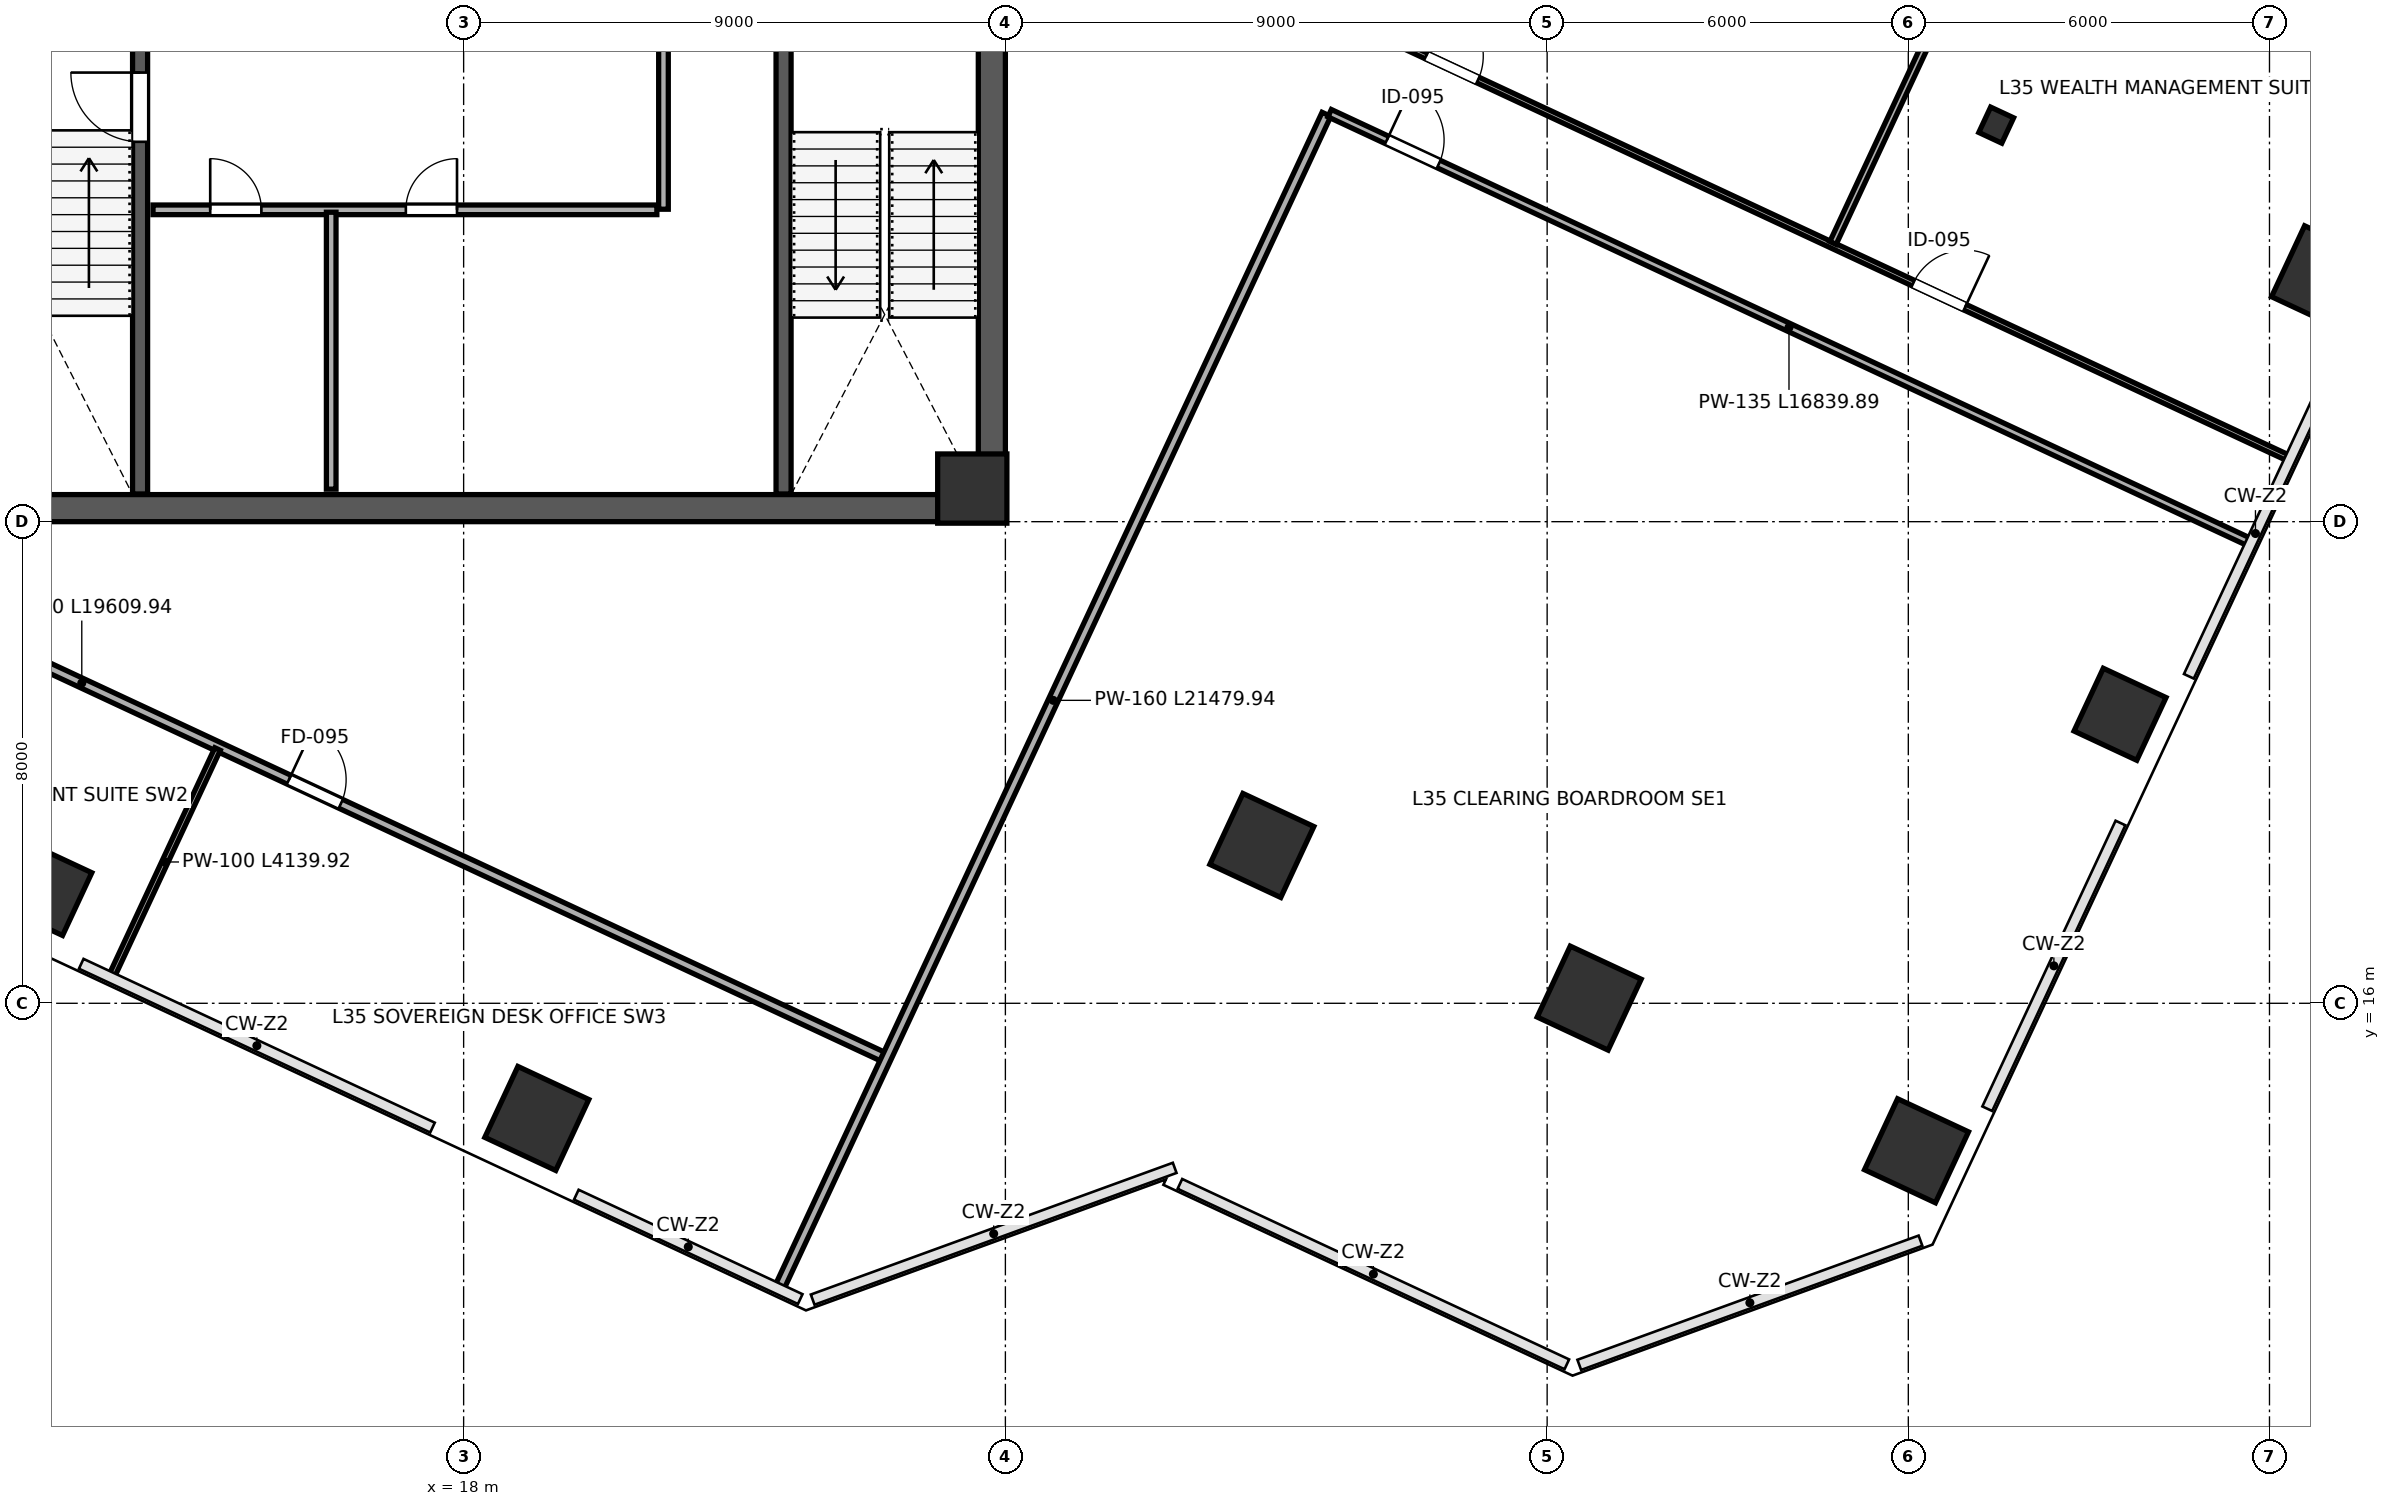
"""IFC4 building model, lengths in metres.
Left out: names, types, materials, properties, quantities, classifications, styles, units other than length and angle.
Written with IfcOpenShell. Run it as: python <this file> out.ifc"""

import sys

from ifc_helpers import new_model, si_unit, direction, frame, frame_2d, origin, origin_2d, place, context, subcontext, project, spatial, rectangle, i_section, extrude, clip, halfspace, source, transform, mapped, element, fill, save


model = new_model("IFC4")
c1 = context("Model", 3, precision=1e-05, world=origin(), true_north=direction((0.0, 1.0)))
c2 = subcontext(c1, "Body", "Model", "MODEL_VIEW")
j1 = project(units=[si_unit("LENGTHUNIT", "METRE"), si_unit("PLANEANGLEUNIT", "RADIAN")], contexts=[c1])
p1 = place(None, origin())
s1 = spatial("IfcSite", under=j1, at=p1, CompositionType="ELEMENT")
p2 = place(p1, origin())
s2 = spatial("IfcBuilding", under=s1, at=p2, CompositionType="ELEMENT")
p3 = place(p2, frame((0.0, 0.0, 158.2)))
s3 = spatial("IfcBuildingStorey", under=s2, at=p3, CompositionType="ELEMENT", Elevation=158.2)
m1 = source(origin(), c2, "Body", "SweptSolid", [
    extrude(rectangle(XDim=1.15, YDim=1.15, at=origin_2d()), origin(), (0.0, 0.0, 1.0), 4.198),
])
p4 = place(p3, frame((26.45, 24.55, 0.001), z_axis=(0.0, 0.0, 1.0), x_axis=(1.0, 0.0, 0.0)))
e1 = element("IfcColumn", 1, at=p4, inside=s3, PredefinedType="COLUMN", context=c2, shape_type="MappedRepresentation", body=[
    mapped(m1, transform((0.0, 0.0, 0.0), scale=1.0)),
])
p5 = place(p3, frame((11.059, 17.891, 0.0), z_axis=(-0.072361701671, 0.054821225186, 0.995870683071), x_axis=(0.882762810031, 0.468249744812, 0.038366622345)))
e2 = element("IfcColumn", 2, at=p5, inside=s3, PredefinedType="COLUMN", context=c2, shape_type="Clipping", body=[
    clip(clip(extrude(rectangle(XDim=1.15, YDim=1.15, at=origin_2d()), origin(), (0.0, 0.0, 1.0), 4.217), halfspace(frame((0.0, 0.0, 0.07), z_axis=(0.0, 0.0, -1.0), x_axis=(1.0, 0.0, 0.0)), False)), halfspace(frame((0.0, 0.0, 4.147), z_axis=(0.0, 0.0, 1.0), x_axis=(1.0, 0.0, 0.0)), False)),
])
p6 = place(p3, frame((19.216, 14.087, 0.0), z_axis=(-0.092542400719, 0.012790413107, 0.995626591349), x_axis=(0.540890321922, 0.84016595982, 0.039481889649)))
e3 = element("IfcColumn", 3, at=p6, inside=s3, PredefinedType="COLUMN", context=c2, shape_type="Clipping", body=[
    clip(clip(extrude(rectangle(XDim=1.3, YDim=1.3, at=origin_2d()), origin(), (0.0, 0.0, 1.0), 4.219), halfspace(frame((0.0, 0.0, 0.082), z_axis=(0.0, 0.0, -1.0), x_axis=(1.0, 0.0, 0.0)), False)), halfspace(frame((0.0, 0.0, 4.137), z_axis=(0.0, 0.0, 1.0), x_axis=(1.0, 0.0, 0.0)), False)),
])
p7 = place(p3, frame((31.26, 18.622, 0.0), z_axis=(-0.069788190522, -0.049749423783, 0.996320532408), x_axis=(-0.18322145328, 0.982404176345, 0.036220620606)))
e4 = element("IfcColumn", 4, at=p7, inside=s3, PredefinedType="COLUMN", context=c2, shape_type="Clipping", body=[
    clip(clip(extrude(rectangle(XDim=1.3, YDim=1.3, at=origin_2d()), origin(), (0.0, 0.0, 1.0), 4.216), halfspace(frame((0.0, 0.0, 0.075), z_axis=(0.0, 0.0, -1.0), x_axis=(1.0, 0.0, 0.0)), False)), halfspace(frame((0.0, 0.0, 4.141), z_axis=(0.0, 0.0, 1.0), x_axis=(1.0, 0.0, 0.0)), False)),
])
p8 = place(p3, frame((36.698, 16.086, 0.0), z_axis=(-0.082991265624, -0.077562470239, 0.993527308654), x_axis=(-0.312067697366, 0.948846199102, 0.04800669443)))
e5 = element("IfcColumn", 5, at=p8, inside=s3, PredefinedType="COLUMN", context=c2, shape_type="Clipping", body=[
    clip(clip(extrude(rectangle(XDim=1.3, YDim=1.3, at=origin_2d()), origin(), (0.0, 0.0, 1.0), 4.227), halfspace(frame((0.0, 0.0, 0.099), z_axis=(0.0, 0.0, -1.0), x_axis=(1.0, 0.0, 0.0)), False)), halfspace(frame((0.0, 0.0, 4.128), z_axis=(0.0, 0.0, 1.0), x_axis=(1.0, 0.0, 0.0)), False)),
])
p9 = place(p3, frame((43.46, 30.587, 0.0), z_axis=(-0.008489733, -0.113254193287, 0.993529774157), x_axis=(-0.87238491172, 0.486457395979, 0.04799758016)))
e6 = element("IfcColumn", 6, at=p9, inside=s3, PredefinedType="COLUMN", context=c2, shape_type="Clipping", body=[
    clip(clip(extrude(i_section(OverallWidth=0.421, OverallDepth=0.465, WebThickness=0.045, FlangeThickness=0.072, FilletRadius=0.015, at=origin_2d()), origin(), (0.0, 0.0, 1.0), 4.227), halfspace(frame((0.0, 0.0, 0.035), z_axis=(0.0, 0.0, -1.0), x_axis=(1.0, 0.0, 0.0)), False)), halfspace(frame((0.0, 0.0, 4.192), z_axis=(0.0, 0.0, 1.0), x_axis=(1.0, 0.0, 0.0)), False)),
])
p10 = place(p3, frame((42.136, 13.55, 0.0), z_axis=(-0.096030134675, -0.105063526612, 0.989818098748), x_axis=(-0.386748392781, 0.920221221066, 0.06015467547)))
e7 = element("IfcColumn", 7, at=p10, inside=s3, PredefinedType="COLUMN", context=c2, shape_type="Clipping", body=[
    clip(clip(extrude(rectangle(XDim=1.3, YDim=1.3, at=origin_2d()), origin(), (0.0, 0.0, 1.0), 4.243), halfspace(frame((0.0, 0.0, 0.125), z_axis=(0.0, 0.0, -1.0), x_axis=(1.0, 0.0, 0.0)), False)), halfspace(frame((0.0, 0.0, 4.118), z_axis=(0.0, 0.0, 1.0), x_axis=(1.0, 0.0, 0.0)), False)),
])
p11 = place(p3, frame((45.517, 20.801, 0.0), z_axis=(-0.058968527482, -0.122947076342, 0.990659744406), x_axis=(-0.636119850373, 0.769435288121, 0.05762701932)))
e8 = element("IfcColumn", 8, at=p11, inside=s3, PredefinedType="COLUMN", context=c2, shape_type="Clipping", body=[
    clip(clip(extrude(rectangle(XDim=1.15, YDim=1.15, at=origin_2d()), origin(), (0.0, 0.0, 1.0), 4.24), halfspace(frame((0.0, 0.0, 0.106), z_axis=(0.0, 0.0, -1.0), x_axis=(1.0, 0.0, 0.0)), False)), halfspace(frame((0.0, 0.0, 4.134), z_axis=(0.0, 0.0, 1.0), x_axis=(1.0, 0.0, 0.0)), False)),
])
p12 = place(p3, frame((48.898, 28.051, 0.0), z_axis=(-0.021864344018, -0.140622254685, 0.989821868797), x_axis=(-0.831278676398, 0.552592535403, 0.060143594692)))
e9 = element("IfcColumn", 9, at=p12, inside=s3, PredefinedType="COLUMN", context=c2, shape_type="Clipping", body=[
    clip(clip(extrude(rectangle(XDim=1.3, YDim=1.3, at=origin_2d()), origin(), (0.0, 0.0, 1.0), 4.243), halfspace(frame((0.0, 0.0, 0.125), z_axis=(0.0, 0.0, -1.0), x_axis=(1.0, 0.0, 0.0)), False)), halfspace(frame((0.0, 0.0, 4.118), z_axis=(0.0, 0.0, 1.0), x_axis=(1.0, 0.0, 0.0)), False)),
])
p13 = place(p3, frame((26.775, 24.45, 0.0), z_axis=(0.0, 0.0, 1.0), x_axis=(0.0, 1.0, 0.0)))
e10 = element("IfcWall", 10, at=p13, inside=s3, PredefinedType="SHEAR", context=c2, shape_type="SweptSolid", body=[
    extrude(rectangle(XDim=15.1, YDim=0.45, at=frame_2d((7.55, 0.0))), origin(), (0.0, 0.0, 1.0), 3.96),
])
p14 = place(p13, frame((8.6, 0.0, 0.0)))
e11 = element("IfcOpeningElement", 11, at=p14, cuts=e10, PredefinedType="OPENING", context=c2, shape_type="SweptSolid", body=[
    extrude(rectangle(XDim=1.15, YDim=2.2, at=frame_2d((0.575, 1.1))), frame((0.0, 0.235, 0.0), z_axis=(0.0, -1.0, 0.0), x_axis=(1.0, 0.0, 0.0)), (0.0, 0.0, 1.0), 0.47),
])
p15 = place(p3, frame((9.0, 24.225, 0.0), z_axis=(0.0, 0.0, 1.0), x_axis=(1.0, 0.0, 0.0)))
e12 = element("IfcWall", 12, at=p15, inside=s3, PredefinedType="SHEAR", context=c2, shape_type="SweptSolid", body=[
    extrude(rectangle(XDim=18.0, YDim=0.45, at=frame_2d((9.0, 0.0))), origin(), (0.0, 0.0, 1.0), 3.96),
])
p16 = place(p3, frame((12.625, 24.46, 0.0), z_axis=(0.0, 0.0, 1.0), x_axis=(0.0, 1.0, 0.0)))
e13 = element("IfcWall", 13, at=p16, inside=s3, PredefinedType="SHEAR", context=c2, shape_type="SweptSolid", body=[
    extrude(rectangle(XDim=7.49, YDim=0.25, at=frame_2d((3.745, 0.0))), origin(), (0.0, 0.0, 1.0), 3.96),
])
p17 = place(p16, frame((5.85, 0.0, 0.0)))
e14 = element("IfcOpeningElement", 14, at=p17, cuts=e13, PredefinedType="OPENING", context=c2, shape_type="SweptSolid", body=[
    extrude(rectangle(XDim=1.15, YDim=2.2, at=frame_2d((0.575, 1.1))), frame((0.0, 0.135, 0.0), z_axis=(0.0, -1.0, 0.0), x_axis=(1.0, 0.0, 0.0)), (0.0, 0.0, 1.0), 0.27),
])
p18 = place(p3, frame((23.315, 24.46, 0.0), z_axis=(0.0, 0.0, 1.0), x_axis=(0.0, 1.0, 0.0)))
e15 = element("IfcWall", 15, at=p18, inside=s3, PredefinedType="SHEAR", context=c2, shape_type="SweptSolid", body=[
    extrude(rectangle(XDim=7.49, YDim=0.25, at=frame_2d((3.745, 0.0))), origin(), (0.0, 0.0, 1.0), 3.96),
])
p19 = place(p3, frame((12.84, 29.18, 0.0), z_axis=(0.0, 0.0, 1.0), x_axis=(1.0, 0.0, 0.0)))
e16 = element("IfcWall", 16, at=p19, inside=s3, PredefinedType="PARTITIONING", context=c2, shape_type="SweptSolid", body=[
    extrude(rectangle(XDim=8.37, YDim=0.16, at=frame_2d((4.185, 0.0))), origin(), (0.0, 0.0, 1.0), 3.96),
])
p20 = place(p19, frame((0.95, 0.0, 0.0)))
e17 = element("IfcOpeningElement", 17, at=p20, cuts=e16, PredefinedType="OPENING", context=c2, shape_type="SweptSolid", body=[
    extrude(rectangle(XDim=0.85, YDim=2.1, at=frame_2d((0.425, 1.05))), frame((0.0, 0.09, 0.0), z_axis=(0.0, -1.0, 0.0), x_axis=(1.0, 0.0, 0.0)), (0.0, 0.0, 1.0), 0.18),
])
p21 = place(p19, frame((4.2, 0.0, 0.0)))
e18 = element("IfcOpeningElement", 18, at=p21, cuts=e16, PredefinedType="OPENING", context=c2, shape_type="SweptSolid", body=[
    extrude(rectangle(XDim=0.85, YDim=2.1, at=frame_2d((0.425, 1.05))), frame((0.0, 0.09, 0.0), z_axis=(0.0, -1.0, 0.0), x_axis=(1.0, 0.0, 0.0)), (0.0, 0.0, 1.0), 0.18),
])
p22 = place(p3, frame((15.8, 24.54, 0.0), z_axis=(0.0, 0.0, 1.0), x_axis=(0.0, 1.0, 0.0)))
e19 = element("IfcWall", 19, at=p22, inside=s3, PredefinedType="PARTITIONING", context=c2, shape_type="SweptSolid", body=[
    extrude(rectangle(XDim=4.6, YDim=0.16, at=frame_2d((2.3, 0.0))), origin(), (0.0, 0.0, 1.0), 3.96),
])
p23 = place(p3, frame((21.32, 29.19, 0.0), z_axis=(0.0, 0.0, 1.0), x_axis=(0.0, 1.0, 0.0)))
e20 = element("IfcWall", 20, at=p23, inside=s3, PredefinedType="PARTITIONING", context=c2, shape_type="SweptSolid", body=[
    extrude(rectangle(XDim=2.92, YDim=0.16, at=frame_2d((1.46, 0.0))), origin(), (0.0, 0.0, 1.0), 3.96),
])
p24 = place(p3, frame((7.213, 23.391, 0.0), z_axis=(0.0, 0.0, 1.0), x_axis=(0.906304602938, -0.422625089996, 0.0)))
e21 = element("IfcWall", 21, at=p24, inside=s3, PredefinedType="PARTITIONING", context=c2, shape_type="SweptSolid", body=[
    extrude(rectangle(XDim=19.61, YDim=0.16, at=frame_2d((9.805, 0.0))), origin(), (0.0, 0.0, 1.0), 3.96),
])
p25 = place(p24, frame((1.45, 0.0, 0.0)))
e22 = element("IfcOpeningElement", 22, at=p25, cuts=e21, PredefinedType="OPENING", context=c2, shape_type="SweptSolid", body=[
    extrude(rectangle(XDim=0.95, YDim=2.15, at=frame_2d((0.475, 1.075))), frame((0.0, 0.09, 0.0), z_axis=(0.0, -1.0, 0.0), x_axis=(1.0, 0.0, 0.0)), (0.0, 0.0, 1.0), 0.18),
])
p26 = place(p24, frame((8.7, 0.0, 0.0)))
e23 = element("IfcOpeningElement", 23, at=p26, cuts=e21, PredefinedType="OPENING", context=c2, shape_type="SweptSolid", body=[
    extrude(rectangle(XDim=0.95, YDim=2.15, at=frame_2d((0.475, 1.075))), frame((0.0, 0.09, 0.0), z_axis=(0.0, -1.0, 0.0), x_axis=(1.0, 0.0, 0.0)), (0.0, 0.0, 1.0), 0.18),
])
p27 = place(p3, frame((12.162, 16.471, 0.0), z_axis=(0.0, 0.0, 1.0), x_axis=(0.422656233697, 0.906290079454, 0.0)))
e24 = element("IfcWall", 24, at=p27, inside=s3, PredefinedType="PARTITIONING", context=c2, shape_type="SweptSolid", body=[
    extrude(rectangle(XDim=4.14, YDim=0.1, at=frame_2d((2.07, 0.0))), origin(), (0.0, 0.0, 1.0), 3.195),
])
p28 = place(p3, frame((1.756, 27.635, 0.0), z_axis=(0.0, 0.0, 1.0), x_axis=(0.422615732035, 0.906308966653, 0.0)))
e25 = element("IfcWall", 25, at=p28, inside=s3, PredefinedType="PARTITIONING", context=c2, shape_type="SweptSolid", body=[
    extrude(rectangle(XDim=23.34, YDim=0.135, at=frame_2d((11.67, 0.0))), origin(), (0.0, 0.0, 1.0), 3.96),
])
p29 = place(p28, frame((1.3, 0.0, 0.0)))
e26 = element("IfcOpeningElement", 26, at=p29, cuts=e25, PredefinedType="OPENING", context=c2, shape_type="SweptSolid", body=[
    extrude(rectangle(XDim=0.95, YDim=2.15, at=frame_2d((0.475, 1.075))), frame((0.0, 0.078, 0.0), z_axis=(0.0, -1.0, 0.0), x_axis=(1.0, 0.0, 0.0)), (0.0, 0.0, 1.0), 0.155),
])
p30 = place(p28, frame((9.4, 0.0, 0.0)))
e27 = element("IfcOpeningElement", 27, at=p30, cuts=e25, PredefinedType="OPENING", context=c2, shape_type="SweptSolid", body=[
    extrude(rectangle(XDim=0.95, YDim=2.15, at=frame_2d((0.475, 1.075))), frame((0.0, 0.078, 0.0), z_axis=(0.0, -1.0, 0.0), x_axis=(1.0, 0.0, 0.0)), (0.0, 0.0, 1.0), 0.155),
])
p31 = place(p3, frame((23.256, 11.299, 0.0), z_axis=(0.0, 0.0, 1.0), x_axis=(0.422623489462, 0.906305349292, 0.0)))
e28 = element("IfcWall", 28, at=p31, inside=s3, PredefinedType="PARTITIONING", context=c2, shape_type="SweptSolid", body=[
    extrude(rectangle(XDim=21.48, YDim=0.16, at=frame_2d((10.74, 0.0))), origin(), (0.0, 0.0, 1.0), 3.96),
])
p32 = place(p3, frame((33.038, 32.181, 0.0), z_axis=(0.0, 0.0, 1.0), x_axis=(0.906309400931, -0.422614800716, 0.0)))
e29 = element("IfcWall", 29, at=p32, inside=s3, PredefinedType="PARTITIONING", context=c2, shape_type="SweptSolid", body=[
    extrude(rectangle(XDim=16.84, YDim=0.1, at=frame_2d((8.42, 0.0))), origin(), (0.0, 0.0, 1.0), 3.96),
])
p33 = place(p32, frame((1.05, 0.0, 0.0)))
e30 = element("IfcOpeningElement", 30, at=p33, cuts=e29, PredefinedType="OPENING", context=c2, shape_type="SweptSolid", body=[
    extrude(rectangle(XDim=0.95, YDim=2.15, at=frame_2d((0.475, 1.075))), frame((0.0, 0.06, 0.0), z_axis=(0.0, -1.0, 0.0), x_axis=(1.0, 0.0, 0.0)), (0.0, 0.0, 1.0), 0.12),
])
p34 = place(p32, frame((9.98, 0.0, 0.0)))
e31 = element("IfcOpeningElement", 31, at=p34, cuts=e29, PredefinedType="OPENING", context=c2, shape_type="SweptSolid", body=[
    extrude(rectangle(XDim=0.95, YDim=2.15, at=frame_2d((0.475, 1.075))), frame((0.0, 0.06, 0.0), z_axis=(0.0, -1.0, 0.0), x_axis=(1.0, 0.0, 0.0)), (0.0, 0.0, 1.0), 0.12),
])
p35 = place(p3, frame((32.387, 30.785, 0.0), z_axis=(0.0, 0.0, 1.0), x_axis=(0.906303847891, -0.422626709163, 0.0)))
e32 = element("IfcWall", 32, at=p35, inside=s3, PredefinedType="PARTITIONING", context=c2, shape_type="SweptSolid", body=[
    extrude(rectangle(XDim=16.84, YDim=0.135, at=frame_2d((8.42, 0.0))), origin(), (0.0, 0.0, 1.0), 3.96),
])
p36 = place(p35, frame((1.05, 0.0, 0.0)))
e33 = element("IfcOpeningElement", 33, at=p36, cuts=e32, PredefinedType="OPENING", context=c2, shape_type="SweptSolid", body=[
    extrude(rectangle(XDim=0.95, YDim=2.15, at=frame_2d((0.475, 1.075))), frame((0.0, 0.078, 0.0), z_axis=(0.0, -1.0, 0.0), x_axis=(1.0, 0.0, 0.0)), (0.0, 0.0, 1.0), 0.155),
])
p37 = place(p3, frame((40.749, 28.629, 0.0), z_axis=(0.0, 0.0, 1.0), x_axis=(0.422632554077, 0.906301122274, 0.0)))
e34 = element("IfcWall", 34, at=p37, inside=s3, PredefinedType="PARTITIONING", context=c2, shape_type="SweptSolid", body=[
    extrude(rectangle(XDim=10.94, YDim=0.115, at=frame_2d((5.47, 0.0))), origin(), (0.0, 0.0, 1.0), 3.96),
])
m2 = source(origin(), c2, "Body", "SweptSolid", [
    extrude(rectangle(XDim=1.15, YDim=2.2, at=frame_2d((0.575, 1.1))), frame((0.0, 0.025, 0.0), z_axis=(0.0, -1.0, 0.0), x_axis=(1.0, 0.0, 0.0)), (0.0, 0.0, 1.0), 0.05),
])
p38 = place(p17, origin())
e35 = element("IfcDoor", 35, at=p38, inside=s3, OperationType="SINGLE_SWING_RIGHT", PredefinedType="DOOR", context=c2, shape_type="MappedRepresentation", body=[
    mapped(m2, transform((0.0, 0.0, 0.0), scale=1.0)),
])
fill(e14, e35)
m3 = source(origin(), c2, "Body", "SweptSolid", [
    extrude(rectangle(XDim=0.85, YDim=2.1, at=frame_2d((0.425, 1.05))), frame((0.0, 0.025, 0.0), z_axis=(0.0, -1.0, 0.0), x_axis=(1.0, 0.0, 0.0)), (0.0, 0.0, 1.0), 0.05),
])
p39 = place(p20, origin())
e36 = element("IfcDoor", 36, at=p39, inside=s3, OperationType="SINGLE_SWING_LEFT", PredefinedType="DOOR", context=c2, shape_type="MappedRepresentation", body=[
    mapped(m3, transform((0.0, 0.0, 0.0), scale=1.0)),
])
fill(e17, e36)
p40 = place(p21, origin())
e37 = element("IfcDoor", 37, at=p40, inside=s3, OperationType="SINGLE_SWING_RIGHT", PredefinedType="DOOR", context=c2, shape_type="MappedRepresentation", body=[
    mapped(m3, transform((0.0, 0.0, 0.0), scale=1.0)),
])
fill(e18, e37)
m4 = source(origin(), c2, "Body", "SweptSolid", [
    extrude(rectangle(XDim=0.95, YDim=2.15, at=frame_2d((0.475, 1.075))), frame((0.0, 0.025, 0.0), z_axis=(0.0, -1.0, 0.0), x_axis=(1.0, 0.0, 0.0)), (0.0, 0.0, 1.0), 0.05),
])
p41 = place(p26, origin())
e38 = element("IfcDoor", 38, at=p41, inside=s3, OperationType="SINGLE_SWING_LEFT", PredefinedType="DOOR", context=c2, shape_type="MappedRepresentation", body=[
    mapped(m4, transform((0.0, 0.0, 0.0), scale=1.0)),
])
fill(e23, e38)
m5 = source(origin(), c2, "Body", "SweptSolid", [
    extrude(rectangle(XDim=0.95, YDim=2.15, at=frame_2d((0.475, 1.075))), frame((0.0, 0.025, 0.0), z_axis=(0.0, -1.0, 0.0), x_axis=(1.0, 0.0, 0.0)), (0.0, 0.0, 1.0), 0.05),
])
p42 = place(p33, origin())
e39 = element("IfcDoor", 39, at=p42, inside=s3, OperationType="SINGLE_SWING_LEFT", PredefinedType="DOOR", context=c2, shape_type="MappedRepresentation", body=[
    mapped(m5, transform((0.0, 0.0, 0.0), scale=1.0)),
])
fill(e30, e39)
p43 = place(p34, origin())
e40 = element("IfcDoor", 40, at=p43, inside=s3, OperationType="SINGLE_SWING_RIGHT", PredefinedType="DOOR", context=c2, shape_type="MappedRepresentation", body=[
    mapped(m5, transform((0.0, 0.0, 0.0), scale=1.0)),
])
fill(e31, e40)
p44 = place(p36, origin())
e41 = element("IfcDoor", 41, at=p44, inside=s3, OperationType="SINGLE_SWING_LEFT", PredefinedType="DOOR", context=c2, shape_type="MappedRepresentation", body=[
    mapped(m5, transform((0.0, 0.0, 0.0), scale=1.0)),
])
fill(e33, e41)
save(model, sys.argv[1])
